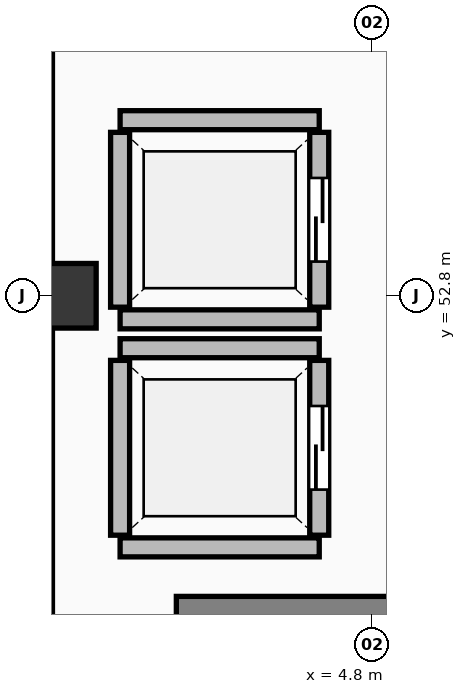
"""IFC4 building model, lengths in metres.
Left out: names, types, materials, properties, quantities, classifications, styles, units other than length and angle.
Written with IfcOpenShell. Run it as: python <this file> out.ifc"""

import sys

from ifc_helpers import new_model, si_unit, direction, frame, frame_2d, origin, origin_2d, place, context, subcontext, project, spatial, rectangle, extrude, element, fill, save


model = new_model("IFC4")
c1 = context("Model", 3, precision=1e-05, world=origin(), true_north=direction((0.0, 1.0)))
c2 = subcontext(c1, "Body", "Model", "MODEL_VIEW")
j1 = project(units=[si_unit("LENGTHUNIT", "METRE"), si_unit("PLANEANGLEUNIT", "RADIAN")], contexts=[c1])
p1 = place(None, origin())
s1 = spatial("IfcSite", under=j1, at=p1, CompositionType="ELEMENT")
p2 = place(p1, origin())
s2 = spatial("IfcBuilding", under=s1, at=p2, CompositionType="ELEMENT")
p3 = place(p2, frame((0.0, 0.0, -8.4)))
s3 = spatial("IfcBuildingStorey", under=s2, at=p3, CompositionType="ELEMENT", Elevation=-8.4)
p4 = place(p3, frame((0.75, 52.8, 0.0), z_axis=(0.0, 0.0, 1.0), x_axis=(1.0, 0.0, 0.0)))
e1 = element("IfcColumn", 1, at=p4, inside=s3, PredefinedType="COLUMN", context=c2, shape_type="SweptSolid", body=[
    extrude(rectangle(XDim=0.85, YDim=0.85, at=origin_2d()), origin(), (0.0, 0.0, 1.0), 4.2),
])
p5 = place(p3, frame((2.23, 48.62, 0.0), z_axis=(0.0, 0.0, 1.0), x_axis=(1.0, 0.0, 0.0)))
e2 = element("IfcWall", 2, at=p5, inside=s3, PredefinedType="SHEAR", context=c2, shape_type="SweptSolid", body=[
    extrude(rectangle(XDim=5.15, YDim=0.45, at=frame_2d((2.575, 0.0))), origin(), (0.0, 0.0, 1.0), 3.86),
])
for number, where, z_axis, x_axis in (
    (3, (1.49, 49.49, 0.0), (0.0, 0.0, 1.0), (1.0, 0.0, 0.0)),
    (4, (1.49, 52.11, 0.0), (0.0, 0.0, 1.0), (1.0, 0.0, 0.0)),
):
    element("IfcWall", number, at=place(p3, frame(where, z_axis=z_axis, x_axis=x_axis)), inside=s3, PredefinedType="SOLIDWALL", context=c2, shape_type="SweptSolid", body=[
        extrude(rectangle(XDim=2.62, YDim=0.25, at=frame_2d((1.31, 0.0))), origin(), (0.0, 0.0, 1.0), 3.86),
    ])
p6 = place(p3, frame((1.49, 49.65, 0.0), z_axis=(0.0, 0.0, 1.0), x_axis=(0.0, 1.0, 0.0)))
e5 = element("IfcWall", 5, at=p6, inside=s3, PredefinedType="SOLIDWALL", context=c2, shape_type="SweptSolid", body=[
    extrude(rectangle(XDim=2.3, YDim=0.25, at=frame_2d((1.15, 0.0))), origin(), (0.0, 0.0, 1.0), 3.86),
])
p7 = place(p3, frame((4.11, 49.65, 0.0), z_axis=(0.0, 0.0, 1.0), x_axis=(0.0, 1.0, 0.0)))
e6 = element("IfcWall", 6, at=p7, inside=s3, PredefinedType="SOLIDWALL", context=c2, shape_type="SweptSolid", body=[
    extrude(rectangle(XDim=2.3, YDim=0.25, at=frame_2d((1.15, 0.0))), origin(), (0.0, 0.0, 1.0), 3.86),
])
p8 = place(p7, frame((0.6, 0.0, 0.0)))
e7 = element("IfcOpeningElement", 7, at=p8, cuts=e6, PredefinedType="OPENING", context=c2, shape_type="SweptSolid", body=[
    extrude(rectangle(XDim=1.1, YDim=2.2, at=frame_2d((0.55, 1.1))), frame((0.0, 0.137, 0.0), z_axis=(0.0, -1.0, 0.0), x_axis=(1.0, 0.0, 0.0)), (0.0, 0.0, 1.0), 0.274),
])
p9 = place(p3, frame((1.49, 52.49, 0.0), z_axis=(0.0, 0.0, 1.0), x_axis=(1.0, 0.0, 0.0)))
e8 = element("IfcWall", 8, at=p9, inside=s3, PredefinedType="SOLIDWALL", context=c2, shape_type="SweptSolid", body=[
    extrude(rectangle(XDim=2.62, YDim=0.25, at=frame_2d((1.31, 0.0))), origin(), (0.0, 0.0, 1.0), 2.972),
])
p10 = place(p3, frame((1.49, 55.11, 0.0), z_axis=(0.0, 0.0, 1.0), x_axis=(1.0, 0.0, 0.0)))
e9 = element("IfcWall", 9, at=p10, inside=s3, PredefinedType="SOLIDWALL", context=c2, shape_type="SweptSolid", body=[
    extrude(rectangle(XDim=2.62, YDim=0.25, at=frame_2d((1.31, 0.0))), origin(), (0.0, 0.0, 1.0), 3.86),
])
p11 = place(p3, frame((1.49, 52.65, 0.0), z_axis=(0.0, 0.0, 1.0), x_axis=(0.0, 1.0, 0.0)))
e10 = element("IfcWall", 10, at=p11, inside=s3, PredefinedType="SOLIDWALL", context=c2, shape_type="SweptSolid", body=[
    extrude(rectangle(XDim=2.3, YDim=0.25, at=frame_2d((1.15, 0.0))), origin(), (0.0, 0.0, 1.0), 2.972),
])
p12 = place(p3, frame((4.11, 52.65, 0.0), z_axis=(0.0, 0.0, 1.0), x_axis=(0.0, 1.0, 0.0)))
e11 = element("IfcWall", 11, at=p12, inside=s3, PredefinedType="SOLIDWALL", context=c2, shape_type="SweptSolid", body=[
    extrude(rectangle(XDim=2.3, YDim=0.25, at=frame_2d((1.15, 0.0))), origin(), (0.0, 0.0, 1.0), 2.972),
])
p13 = place(p12, frame((0.6, 0.0, 0.0)))
e12 = element("IfcOpeningElement", 12, at=p13, cuts=e11, PredefinedType="OPENING", context=c2, shape_type="SweptSolid", body=[
    extrude(rectangle(XDim=1.1, YDim=2.2, at=frame_2d((0.55, 1.1))), frame((0.0, 0.137, 0.0), z_axis=(0.0, -1.0, 0.0), x_axis=(1.0, 0.0, 0.0)), (0.0, 0.0, 1.0), 0.274),
])
p14 = place(p8, origin())
e13 = element("IfcDoor", 13, at=p14, inside=s3, OperationType="SLIDING_TO_LEFT", PredefinedType="DOOR", context=c2, shape_type="SweptSolid", body=[
    extrude(rectangle(XDim=1.1, YDim=2.2, at=frame_2d((0.55, 1.1))), frame((0.0, 0.025, 0.0), z_axis=(0.0, -1.0, 0.0), x_axis=(1.0, 0.0, 0.0)), (0.0, 0.0, 1.0), 0.05),
])
fill(e7, e13)
p15 = place(p13, origin())
e14 = element("IfcDoor", 14, at=p15, inside=s3, OperationType="SLIDING_TO_LEFT", PredefinedType="DOOR", context=c2, shape_type="SweptSolid", body=[
    extrude(rectangle(XDim=1.1, YDim=2.2, at=frame_2d((0.55, 1.1))), frame((0.0, 0.025, 0.0), z_axis=(0.0, -1.0, 0.0), x_axis=(1.0, 0.0, 0.0)), (0.0, 0.0, 1.0), 0.05),
])
fill(e12, e14)
save(model, sys.argv[1])
